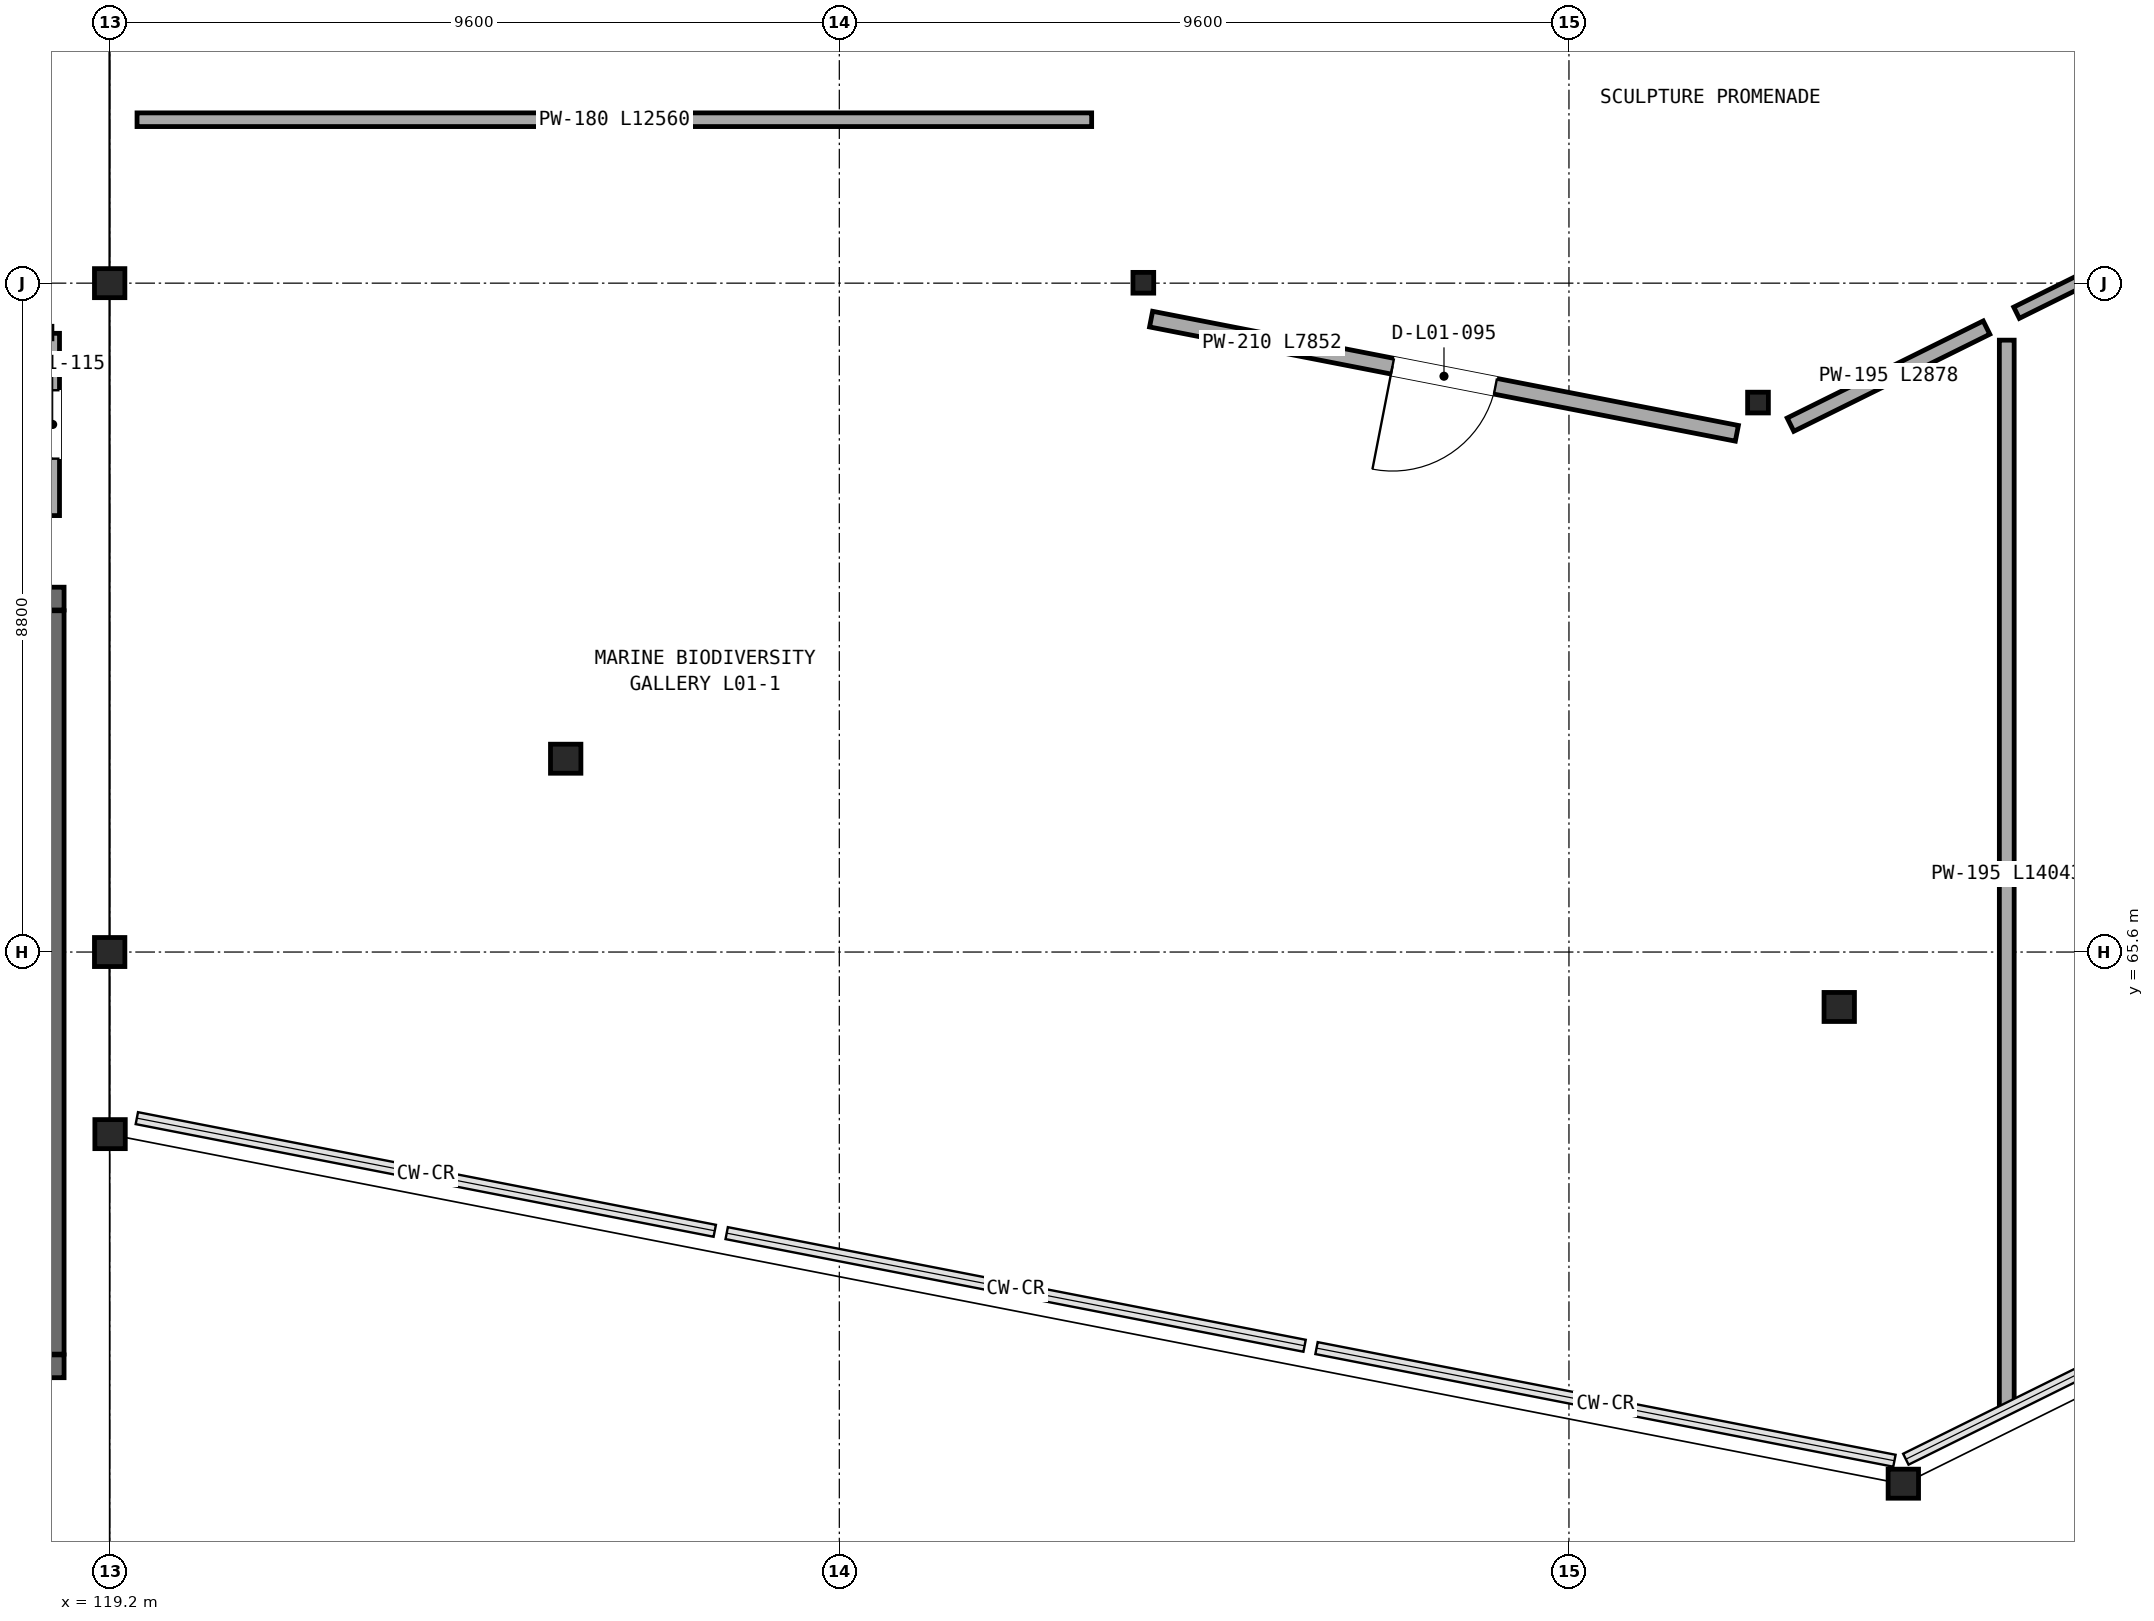
"""IFC4 building model, lengths in metres.
Left out: names, types, materials, properties, quantities, classifications, styles, units other than length and angle.
Written with IfcOpenShell. Run it as: python <this file> out.ifc"""

import sys

from ifc_helpers import new_model, si_unit, direction, frame, frame_2d, origin, origin_2d, place, context, subcontext, project, spatial, rectangle, hollow_circle, i_section, extrude, element, fill, save


model = new_model("IFC4")
c1 = context("Model", 3, precision=1e-05, world=origin(), true_north=direction((0.0, 1.0)))
c2 = subcontext(c1, "Body", "Model", "MODEL_VIEW")
j1 = project(units=[si_unit("LENGTHUNIT", "METRE"), si_unit("PLANEANGLEUNIT", "RADIAN")], contexts=[c1])
p1 = place(None, origin())
s1 = spatial("IfcSite", under=j1, at=p1, CompositionType="ELEMENT")
p2 = place(p1, origin())
s2 = spatial("IfcBuilding", under=s1, at=p2, CompositionType="ELEMENT")
p3 = place(p2, frame((0.0, 0.0, 5.6)))
s3 = spatial("IfcBuildingStorey", under=s2, at=p3, CompositionType="ELEMENT", Elevation=5.6)
for number, where, z_axis, x_axis in (
    (1, (119.2, 65.6, 0.0), (0.0, 0.0, 1.0), (1.0, 0.0, 0.0)),
    (2, (119.2, 74.4, 0.0), (0.0, 0.0, 1.0), (1.0, 0.0, 0.0)),
):
    element("IfcColumn", number, at=place(p3, frame(where, z_axis=z_axis, x_axis=x_axis)), inside=s3, PredefinedType="COLUMN", context=c2, shape_type="SweptSolid", body=[
        extrude(i_section(OverallWidth=0.4, OverallDepth=0.382, WebThickness=0.025, FlangeThickness=0.036, at=origin_2d()), origin(), (0.0, 0.0, 1.0), 4.5),
    ])
p4 = place(p3, frame((119.205, 63.204, 0.04), z_axis=(0.129769907994, 0.106891554152, 0.985765675316), x_axis=(-0.635785996134, 0.771865381475, 0.0)))
e3 = element("IfcColumn", 3, at=p4, inside=s3, PredefinedType="COLUMN", context=c2, shape_type="SweptSolid", body=[
    extrude(i_section(OverallWidth=0.4, OverallDepth=0.382, WebThickness=0.025, FlangeThickness=0.036, at=origin_2d()), origin(), (0.0, 0.0, 1.0), 4.525),
])
p5 = place(p3, frame((125.2, 68.143, 0.0), z_axis=(0.0, 0.0, 1.0), x_axis=(1.0, 0.0, 0.0)))
e4 = element("IfcColumn", 4, at=p5, inside=s3, PredefinedType="COLUMN", context=c2, shape_type="SweptSolid", body=[
    extrude(i_section(OverallWidth=0.4, OverallDepth=0.382, WebThickness=0.025, FlangeThickness=0.036, at=origin_2d()), origin(), (0.0, 0.0, 1.0), 4.5),
])
p6 = place(p3, frame((132.8, 74.405, 0.0), z_axis=(0.0, 0.0, 1.0), x_axis=(1.0, 0.0, 0.0)))
e5 = element("IfcColumn", 5, at=p6, inside=s3, PredefinedType="COLUMN", context=c2, shape_type="SweptSolid", body=[
    extrude(hollow_circle(Radius=0.136, WallThickness=0.009, at=origin_2d()), origin(), (0.0, 0.0, 1.0), 4.5),
])
p7 = place(p3, frame((142.799, 58.605, 0.04), z_axis=(-0.018325211514, 0.136408970914, 0.990483103984), x_axis=(-0.991096683266, -0.133144149024, 0.0)))
e6 = element("IfcColumn", 6, at=p7, inside=s3, PredefinedType="COLUMN", context=c2, shape_type="SweptSolid", body=[
    extrude(i_section(OverallWidth=0.4, OverallDepth=0.382, WebThickness=0.025, FlangeThickness=0.036, at=origin_2d()), origin(), (0.0, 0.0, 1.0), 4.503),
])
p8 = place(p3, frame((141.956, 64.877, 0.0), z_axis=(0.0, 0.0, 1.0), x_axis=(1.0, 0.0, 0.0)))
e7 = element("IfcColumn", 7, at=p8, inside=s3, PredefinedType="COLUMN", context=c2, shape_type="SweptSolid", body=[
    extrude(i_section(OverallWidth=0.4, OverallDepth=0.382, WebThickness=0.025, FlangeThickness=0.036, at=origin_2d()), origin(), (0.0, 0.0, 1.0), 4.5),
])
p9 = place(p3, frame((140.887, 72.829, 0.0), z_axis=(0.0, 0.0, 1.0), x_axis=(1.0, 0.0, 0.0)))
e8 = element("IfcColumn", 8, at=p9, inside=s3, PredefinedType="COLUMN", context=c2, shape_type="SweptSolid", body=[
    extrude(hollow_circle(Radius=0.136, WallThickness=0.009, at=origin_2d()), origin(), (0.0, 0.0, 1.0), 4.5),
])
p10 = place(p3, frame((110.2, 60.15, 0.0), z_axis=(0.0, 0.0, 1.0), x_axis=(1.0, 0.0, 0.0)))
e9 = element("IfcWall", 9, at=p10, inside=s3, PredefinedType="SHEAR", context=c2, shape_type="SweptSolid", body=[
    extrude(rectangle(XDim=8.4, YDim=0.3, at=frame_2d((4.2, 0.0))), origin(), (0.0, 0.0, 1.0), 4.245),
])
p11 = place(p3, frame((118.6, 70.25, 0.0), z_axis=(0.0, 0.0, 1.0), x_axis=(-1.0, 0.0, 0.0)))
e10 = element("IfcWall", 10, at=p11, inside=s3, PredefinedType="SHEAR", context=c2, shape_type="SweptSolid", body=[
    extrude(rectangle(XDim=8.4, YDim=0.3, at=frame_2d((4.2, 0.0))), origin(), (0.0, 0.0, 1.0), 4.245),
])
p12 = place(p11, frame((1.025, 0.0, 0.0)))
e11 = element("IfcOpeningElement", 11, at=p12, cuts=e10, PredefinedType="OPENING", context=c2, shape_type="SweptSolid", body=[
    extrude(rectangle(XDim=1.45, YDim=2.25, at=frame_2d((0.725, 1.125))), frame((0.0, 0.16, 0.0), z_axis=(0.0, -1.0, 0.0), x_axis=(1.0, 0.0, 0.0)), (0.0, 0.0, 1.0), 0.32),
])
p13 = place(p3, frame((118.45, 60.31, 0.0), z_axis=(0.0, 0.0, 1.0), x_axis=(0.0, 1.0, 0.0)))
e12 = element("IfcWall", 12, at=p13, inside=s3, PredefinedType="SHEAR", context=c2, shape_type="SweptSolid", body=[
    extrude(rectangle(XDim=9.78, YDim=0.3, at=frame_2d((4.89, 0.0))), origin(), (0.0, 0.0, 1.0), 4.245),
])
p14 = place(p3, frame((132.902, 73.927, 0.0), z_axis=(0.0, 0.0, 1.0), x_axis=(0.98152920164, -0.191312378918, 0.0)))
e13 = element("IfcWall", 13, at=p14, inside=s3, PredefinedType="PARTITIONING", context=c2, shape_type="SweptSolid", body=[
    extrude(rectangle(XDim=7.852, YDim=0.21, at=frame_2d((3.926, 0.0))), origin(), (0.0, 0.0, 1.0), 4.13),
])
p15 = place(p14, frame((3.236, 0.0, 0.0)))
e14 = element("IfcOpeningElement", 14, at=p15, cuts=e13, PredefinedType="OPENING", context=c2, shape_type="SweptSolid", body=[
    extrude(rectangle(XDim=1.38, YDim=2.24, at=frame_2d((0.69, 1.12))), frame((0.0, 0.115, 0.0), z_axis=(0.0, -1.0, 0.0), x_axis=(1.0, 0.0, 0.0)), (0.0, 0.0, 1.0), 0.23),
])
p16 = place(p3, frame((141.315, 72.538, 0.0), z_axis=(0.0, 0.0, 1.0), x_axis=(0.89618477276, 0.443681026272, 0.0)))
e15 = element("IfcWall", 15, at=p16, inside=s3, PredefinedType="PARTITIONING", context=c2, shape_type="SweptSolid", body=[
    extrude(rectangle(XDim=2.878, YDim=0.195, at=frame_2d((1.439, 0.0))), origin(), (0.0, 0.0, 1.0), 4.13),
])
p17 = place(p3, frame((119.56, 76.55, 0.0), z_axis=(0.0, 0.0, 1.0), x_axis=(1.0, 0.0, 0.0)))
e16 = element("IfcWall", 16, at=p17, inside=s3, PredefinedType="PARTITIONING", context=c2, shape_type="SweptSolid", body=[
    extrude(rectangle(XDim=12.56, YDim=0.18, at=frame_2d((6.28, 0.0))), origin(), (0.0, 0.0, 1.0), 3.51),
])
p18 = place(p3, frame((144.289, 74.011, 0.0), z_axis=(0.0, 0.0, 1.0), x_axis=(0.896175386907, 0.443699984113, 0.0)))
e17 = element("IfcWall", 17, at=p18, inside=s3, PredefinedType="PARTITIONING", context=c2, shape_type="SweptSolid", body=[
    extrude(rectangle(XDim=8.569, YDim=0.165, at=frame_2d((4.284, 0.0))), origin(), (0.0, 0.0, 1.0), 4.13),
])
p19 = place(p3, frame((118.45, 71.342, 0.0), z_axis=(0.0, 0.0, 1.0), x_axis=(0.0, 1.0, 0.0)))
e18 = element("IfcWall", 18, at=p19, inside=s3, PredefinedType="PARTITIONING", context=c2, shape_type="SweptSolid", body=[
    extrude(rectangle(XDim=2.398, YDim=0.18, at=frame_2d((1.199, 0.0))), origin(), (0.0, 0.0, 1.0), 4.13),
])
p20 = place(p19, frame((0.749, 0.0, 0.0)))
e19 = element("IfcOpeningElement", 19, at=p20, cuts=e18, PredefinedType="OPENING", context=c2, shape_type="SweptSolid", body=[
    extrude(rectangle(XDim=0.9, YDim=2.08, at=frame_2d((0.45, 1.04))), frame((0.0, 0.1, 0.0), z_axis=(0.0, -1.0, 0.0), x_axis=(1.0, 0.0, 0.0)), (0.0, 0.0, 1.0), 0.2),
])
p21 = place(p3, frame((144.16, 73.65, 0.0), z_axis=(0.0, 0.0, 1.0), x_axis=(0.0, -1.0, 0.0)))
e20 = element("IfcWall", 20, at=p21, inside=s3, PredefinedType="PARTITIONING", context=c2, shape_type="SweptSolid", body=[
    extrude(rectangle(XDim=14.043, YDim=0.195, at=frame_2d((7.021, 0.0))), origin(), (0.0, 0.0, 1.0), 2.75),
])
p22 = place(p15, frame((1.38, 0.0, 0.0), z_axis=(0.0, 0.0, 1.0), x_axis=(-1.0, 0.0, 0.0)))
e21 = element("IfcDoor", 21, at=p22, inside=s3, OperationType="SINGLE_SWING_LEFT", PredefinedType="DOOR", context=c2, shape_type="SweptSolid", body=[
    extrude(rectangle(XDim=1.38, YDim=2.24, at=frame_2d((0.69, 1.12))), frame((0.0, 0.025, 0.0), z_axis=(0.0, -1.0, 0.0), x_axis=(1.0, 0.0, 0.0)), (0.0, 0.0, 1.0), 0.05),
])
fill(e14, e21)
p23 = place(p20, origin())
e22 = element("IfcDoor", 22, at=p23, inside=s3, OperationType="SINGLE_SWING_LEFT", PredefinedType="DOOR", context=c2, shape_type="SweptSolid", body=[
    extrude(rectangle(XDim=0.9, YDim=2.08, at=frame_2d((0.45, 1.04))), frame((0.0, 0.025, 0.0), z_axis=(0.0, -1.0, 0.0), x_axis=(1.0, 0.0, 0.0)), (0.0, 0.0, 1.0), 0.05),
])
fill(e19, e22)
save(model, sys.argv[1])
